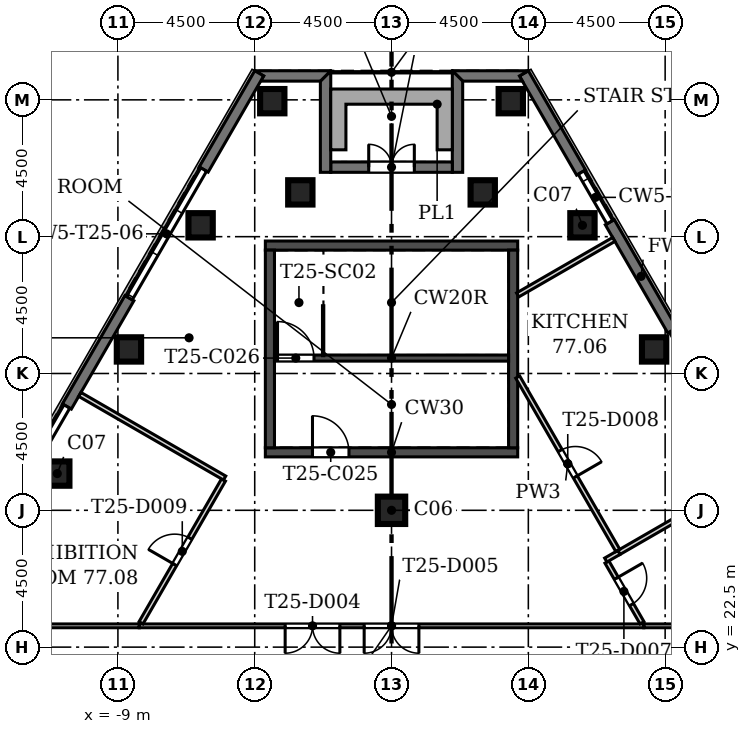
"""IFC4 building model, lengths in metres.
Left out: names, types, materials, properties, quantities, classifications, styles, units other than length and angle.
Written with IfcOpenShell. Run it as: python <this file> out.ifc"""

import sys

from ifc_helpers import new_model, si_unit, direction, frame, frame_2d, origin, origin_2d, place, context, subcontext, project, spatial, polyline, rectangle, outline, extrude, element, fill, save


model = new_model("IFC4")
c1 = context("Model", 3, precision=1e-05, world=origin(), true_north=direction((0.0, 1.0)))
c2 = subcontext(c1, "Body", "Model", "MODEL_VIEW")
j1 = project(units=[si_unit("LENGTHUNIT", "METRE"), si_unit("PLANEANGLEUNIT", "RADIAN")], contexts=[c1])
p1 = place(None, origin())
s1 = spatial("IfcSite", under=j1, at=p1, CompositionType="ELEMENT")
p2 = place(p1, origin())
s2 = spatial("IfcBuilding", under=s1, at=p2, CompositionType="ELEMENT")
p3 = place(p2, frame((0.0, 0.0, 339.3)))
s3 = spatial("IfcBuildingStorey", under=s2, at=p3, CompositionType="ELEMENT", Elevation=339.3)
for number, where, z_axis, x_axis in (
    (1, (8.637, 32.291, 0.0), (0.0, 0.0, 1.0), (1.0, 0.0, 0.0)),
    (2, (6.28, 36.374, 0.0), (0.0, 0.0, 1.0), (1.0, 0.0, 0.0)),
    (3, (3.923, 40.457, 0.0), (0.0, 0.0, 1.0), (1.0, 0.0, 0.0)),
    (4, (3.0, 37.457, 0.0), (0.0, 0.0, 1.0), (1.0, 0.0, 0.0)),
    (5, (-3.0, 37.457, 0.0), (0.0, 0.0, 1.0), (1.0, 0.0, 0.0)),
    (6, (-3.923, 40.457, 0.0), (0.0, 0.0, 1.0), (1.0, 0.0, 0.0)),
    (7, (-6.28, 36.374, 0.0), (0.0, 0.0, 1.0), (1.0, 0.0, 0.0)),
    (8, (-8.637, 32.291, 0.0), (0.0, 0.0, 1.0), (1.0, 0.0, 0.0)),
    (9, (-10.994, 28.208, 0.0), (0.0, 0.0, 1.0), (1.0, 0.0, 0.0)),
):
    element("IfcColumn", number, at=place(p3, frame(where, z_axis=z_axis, x_axis=x_axis)), inside=s3, PredefinedType="COLUMN", context=c2, shape_type="SweptSolid", body=[
        extrude(rectangle(XDim=0.8, YDim=0.8, at=origin_2d()), origin(), (0.0, 0.0, 1.0), 5.4),
    ])
p4 = place(p3, frame((0.0, 27.0, 0.0), z_axis=(0.0, 0.0, 1.0), x_axis=(1.0, 0.0, 0.0)))
e10 = element("IfcColumn", 10, at=p4, inside=s3, PredefinedType="COLUMN", context=c2, shape_type="SweptSolid", body=[
    extrude(rectangle(XDim=0.9, YDim=0.9, at=origin_2d()), origin(), (0.0, 0.0, 1.0), 5.4),
])
p5 = place(p3, frame((9.237, 32.913, 0.0), z_axis=(0.0, 0.0, 1.0), x_axis=(-0.500044296292, 0.865999827798, 0.0)))
e11 = element("IfcWall", 11, at=p5, inside=s3, PredefinedType="SOLIDWALL", context=c2, shape_type="SweptSolid", body=[
    extrude(rectangle(XDim=4.115, YDim=0.34, at=frame_2d((2.058, 0.0))), origin(), (0.0, 0.0, 1.0), 4.6),
])
p6 = place(p3, frame((6.237, 38.109, 0.0), z_axis=(0.0, 0.0, 1.0), x_axis=(-0.500014143148, 0.86601723808, 0.0)))
e12 = element("IfcWall", 12, at=p6, inside=s3, PredefinedType="SOLIDWALL", context=c2, shape_type="SweptSolid", body=[
    extrude(rectangle(XDim=3.768, YDim=0.34, at=frame_2d((1.884, 0.0))), origin(), (0.0, 0.0, 1.0), 4.6),
])
p7 = place(p3, origin())
e13 = element("IfcWall", 13, at=p7, inside=s3, PredefinedType="SOLIDWALL", context=c2, shape_type="SweptSolid", body=[
    extrude(outline(polyline([(1.999, 41.457), (4.501, 41.457), (4.501, 41.457), (4.206, 41.286), (4.305, 41.116), (2.34, 41.116), (1.999, 41.457), (1.999, 41.457)])), origin(), (0.0, 0.0, 1.0), 4.6),
])
p8 = place(p3, origin())
e14 = element("IfcWall", 14, at=p8, inside=s3, PredefinedType="SOLIDWALL", context=c2, shape_type="SweptSolid", body=[
    extrude(outline(polyline([(2.341, 38.116), (2.0, 38.116), (2.0, 41.458), (2.0, 41.458), (2.341, 41.117), (2.341, 38.116)])), origin(), (0.0, 0.0, 1.0), 4.6),
])
p9 = place(p3, frame((2.0, 38.287, 0.0), z_axis=(0.0, 0.0, 1.0), x_axis=(-1.0, 0.0, 0.0)))
e15 = element("IfcWall", 15, at=p9, inside=s3, PredefinedType="SOLIDWALL", context=c2, shape_type="SweptSolid", body=[
    extrude(rectangle(XDim=4.0, YDim=0.34, at=frame_2d((2.0, 0.0))), origin(), (0.0, 0.0, 1.0), 4.6),
])
p10 = place(p9, frame((1.25, 0.0, 0.0)))
e16 = element("IfcOpeningElement", 16, at=p10, cuts=e15, PredefinedType="OPENING", context=c2, shape_type="SweptSolid", body=[
    extrude(rectangle(XDim=1.5, YDim=2.4, at=frame_2d((0.75, 1.2))), frame((0.0, 0.18, 0.0), z_axis=(0.0, -1.0, 0.0), x_axis=(1.0, 0.0, 0.0)), (0.0, 0.0, 1.0), 0.36),
])
p11 = place(p3, origin())
e17 = element("IfcWall", 17, at=p11, inside=s3, PredefinedType="SOLIDWALL", context=c2, shape_type="SweptSolid", body=[
    extrude(outline(polyline([(-2.0, 41.458), (-2.0, 38.116), (-2.341, 38.116), (-2.341, 41.117), (-2.0, 41.458), (-2.0, 41.458)])), origin(), (0.0, 0.0, 1.0), 4.6),
])
p12 = place(p3, origin())
e18 = element("IfcWall", 18, at=p12, inside=s3, PredefinedType="SOLIDWALL", context=c2, shape_type="SweptSolid", body=[
    extrude(outline(polyline([(-4.305, 41.116), (-4.206, 41.286), (-4.501, 41.457), (-4.501, 41.457), (-1.999, 41.457), (-1.999, 41.457), (-2.34, 41.116), (-4.305, 41.116)])), origin(), (0.0, 0.0, 1.0), 4.6),
])
p13 = place(p3, frame((-4.353, 41.372, 0.0), z_axis=(0.0, 0.0, 1.0), x_axis=(-0.499992475648, -0.866029747927, 0.0)))
e19 = element("IfcWall", 19, at=p13, inside=s3, PredefinedType="SOLIDWALL", context=c2, shape_type="SweptSolid", body=[
    extrude(rectangle(XDim=3.652, YDim=0.34, at=frame_2d((1.826, 0.0))), origin(), (0.0, 0.0, 1.0), 4.6),
])
p14 = place(p3, frame((-8.622, 33.978, 0.0), z_axis=(0.0, 0.0, 1.0), x_axis=(-0.499974107589, -0.866040352259, 0.0)))
e20 = element("IfcWall", 20, at=p14, inside=s3, PredefinedType="SOLIDWALL", context=c2, shape_type="SweptSolid", body=[
    extrude(rectangle(XDim=4.115, YDim=0.34, at=frame_2d((2.058, 0.0))), origin(), (0.0, 0.0, 1.0), 4.6),
])
p15 = place(p3, origin())
e21 = element("IfcWall", 21, at=p15, inside=s3, PredefinedType="USERDEFINED", context=c2, shape_type="SweptSolid", body=[
    extrude(outline(polyline([(-1.5, 40.857), (-2.0, 40.857), (-2.0, 40.357), (-2.0, 38.857), (-1.5, 38.857), (-1.5, 40.357), (1.5, 40.357), (1.5, 38.857), (2.0, 38.857), (2.0, 40.357), (2.0, 40.857), (1.5, 40.857), (-1.5, 40.857)])), origin(), (0.0, 0.0, 1.0), 1.1),
])
p16 = place(p3, frame((-4.15, 28.907, -0.4), z_axis=(0.0, 0.0, 1.0), x_axis=(1.0, 0.0, 0.0)))
e22 = element("IfcWall", 22, at=p16, inside=s3, PredefinedType="SOLIDWALL", context=c2, shape_type="SweptSolid", body=[
    extrude(rectangle(XDim=8.3, YDim=0.3, at=frame_2d((4.15, 0.0))), origin(), (0.0, 0.0, 1.0), 5.0),
])
p17 = place(p16, frame((1.55, 0.0, 0.4)))
e23 = element("IfcOpeningElement", 23, at=p17, cuts=e22, PredefinedType="OPENING", context=c2, shape_type="SweptSolid", body=[
    extrude(rectangle(XDim=1.2, YDim=2.1, at=frame_2d((0.6, 1.05))), frame((0.0, 0.16, 0.0), z_axis=(0.0, -1.0, 0.0), x_axis=(1.0, 0.0, 0.0)), (0.0, 0.0, 1.0), 0.32),
])
p18 = place(p3, frame((-4.15, 35.707, -0.4), z_axis=(0.0, 0.0, 1.0), x_axis=(1.0, 0.0, 0.0)))
e24 = element("IfcWall", 24, at=p18, inside=s3, PredefinedType="SOLIDWALL", context=c2, shape_type="SweptSolid", body=[
    extrude(rectangle(XDim=8.3, YDim=0.3, at=frame_2d((4.15, 0.0))), origin(), (0.0, 0.0, 1.0), 5.0),
])
for number, where, z_axis, x_axis in (
    (25, (-4.0, 29.057, -0.4), (0.0, 0.0, 1.0), (0.0, 1.0, 0.0)),
    (26, (4.0, 29.057, -0.4), (0.0, 0.0, 1.0), (0.0, 1.0, 0.0)),
):
    element("IfcWall", number, at=place(p3, frame(where, z_axis=z_axis, x_axis=x_axis)), inside=s3, PredefinedType="SOLIDWALL", context=c2, shape_type="SweptSolid", body=[
        extrude(rectangle(XDim=6.5, YDim=0.3, at=frame_2d((3.25, 0.0))), origin(), (0.0, 0.0, 1.0), 5.0),
    ])
p19 = place(p3, frame((-3.85, 32.007, -0.4), z_axis=(0.0, 0.0, 1.0), x_axis=(1.0, 0.0, 0.0)))
e27 = element("IfcWall", 27, at=p19, inside=s3, PredefinedType="SOLIDWALL", context=c2, shape_type="SweptSolid", body=[
    extrude(rectangle(XDim=7.7, YDim=0.2, at=frame_2d((3.85, 0.0))), origin(), (0.0, 0.0, 1.0), 5.0),
])
p20 = place(p19, frame((0.1, 0.0, 0.4)))
e28 = element("IfcOpeningElement", 28, at=p20, cuts=e27, PredefinedType="OPENING", context=c2, shape_type="SweptSolid", body=[
    extrude(rectangle(XDim=1.2, YDim=2.1, at=frame_2d((0.6, 1.05))), frame((0.0, 0.11, 0.0), z_axis=(0.0, -1.0, 0.0), x_axis=(1.0, 0.0, 0.0)), (0.0, 0.0, 1.0), 0.22),
])
p21 = place(p3, frame((8.297, 23.2, 0.0), z_axis=(0.0, 0.0, 1.0), x_axis=(1.0, 0.0, 0.0)))
e29 = element("IfcWall", 29, at=p21, inside=s3, PredefinedType="PARTITIONING", context=c2, shape_type="SweptSolid", body=[
    extrude(rectangle(XDim=1.303, YDim=0.125, at=frame_2d((0.651, 0.0))), origin(), (0.0, 0.0, 1.0), 4.6),
])
p22 = place(p3, frame((-8.297, 23.2, 0.0), z_axis=(0.0, 0.0, 1.0), x_axis=(1.0, 0.0, 0.0)))
e30 = element("IfcWall", 30, at=p22, inside=s3, PredefinedType="PARTITIONING", context=c2, shape_type="SweptSolid", body=[
    extrude(rectangle(XDim=16.594, YDim=0.125, at=frame_2d((8.297, 0.0))), origin(), (0.0, 0.0, 1.0), 4.6),
])
p23 = place(p22, frame((4.798, 0.0, 0.0)))
e31 = element("IfcOpeningElement", 31, at=p23, cuts=e30, PredefinedType="OPENING", context=c2, shape_type="SweptSolid", body=[
    extrude(rectangle(XDim=1.8, YDim=2.1, at=frame_2d((0.9, 1.05))), frame((0.0, 0.073, 0.0), z_axis=(0.0, -1.0, 0.0), x_axis=(1.0, 0.0, 0.0)), (0.0, 0.0, 1.0), 0.145),
])
p24 = place(p22, frame((7.397, 0.0, 0.0)))
e32 = element("IfcOpeningElement", 32, at=p24, cuts=e30, PredefinedType="OPENING", context=c2, shape_type="SweptSolid", body=[
    extrude(rectangle(XDim=1.8, YDim=2.1, at=frame_2d((0.9, 1.05))), frame((0.0, 0.073, 0.0), z_axis=(0.0, -1.0, 0.0), x_axis=(1.0, 0.0, 0.0)), (0.0, 0.0, 1.0), 0.145),
])
p25 = place(p3, frame((-12.0, 23.2, 0.0), z_axis=(0.0, 0.0, 1.0), x_axis=(1.0, 0.0, 0.0)))
e33 = element("IfcWall", 33, at=p25, inside=s3, PredefinedType="PARTITIONING", context=c2, shape_type="SweptSolid", body=[
    extrude(rectangle(XDim=3.703, YDim=0.125, at=frame_2d((1.852, 0.0))), origin(), (0.0, 0.0, 1.0), 4.6),
])
p26 = place(p3, frame((7.48, 25.615, 0.0), z_axis=(0.0, 0.0, 1.0), x_axis=(0.866046596414, 0.499963291492, 0.0)))
e34 = element("IfcWall", 34, at=p26, inside=s3, PredefinedType="PARTITIONING", context=c2, shape_type="SweptSolid", body=[
    extrude(rectangle(XDim=4.387, YDim=0.15, at=frame_2d((2.194, 0.0))), origin(), (0.0, 0.0, 1.0), 4.6),
])
p27 = place(p3, frame((8.239, 23.3, 0.0), z_axis=(0.0, 0.0, 1.0), x_axis=(-0.499972710878, 0.866041158593, 0.0)))
e35 = element("IfcWall", 35, at=p27, inside=s3, PredefinedType="PARTITIONING", context=c2, shape_type="SweptSolid", body=[
    extrude(rectangle(XDim=2.308, YDim=0.15, at=frame_2d((1.154, 0.0))), origin(), (0.0, 0.0, 1.0), 4.6),
])
p28 = place(p27, frame((0.691, 0.0, 0.0)))
e36 = element("IfcOpeningElement", 36, at=p28, cuts=e35, PredefinedType="OPENING", context=c2, shape_type="SweptSolid", body=[
    extrude(rectangle(XDim=1.0, YDim=2.1, at=frame_2d((0.5, 1.05))), frame((0.0, 0.085, 0.0), z_axis=(0.0, -1.0, 0.0), x_axis=(1.0, 0.0, 0.0)), (0.0, 0.0, 1.0), 0.17),
])
p29 = place(p3, frame((7.047, 25.365, 0.0), z_axis=(0.0, 0.0, 1.0), x_axis=(0.866071776036, 0.499919672301, 0.0)))
e37 = element("IfcWall", 37, at=p29, inside=s3, PredefinedType="PARTITIONING", context=c2, shape_type="SweptSolid", body=[
    extrude(rectangle(XDim=0.5, YDim=0.15, at=frame_2d((0.25, 0.0))), origin(), (0.0, 0.0, 1.0), 4.6),
])
p30 = place(p3, frame((7.443, 25.679, 0.0), z_axis=(0.0, 0.0, 1.0), x_axis=(-0.500014467694, 0.866017050696, 0.0)))
e38 = element("IfcWall", 38, at=p30, inside=s3, PredefinedType="PARTITIONING", context=c2, shape_type="SweptSolid", body=[
    extrude(rectangle(XDim=6.586, YDim=0.15, at=frame_2d((3.293, 0.0))), origin(), (0.0, 0.0, 1.0), 4.6),
])
p31 = place(p30, frame((2.793, 0.0, 0.0)))
e39 = element("IfcOpeningElement", 39, at=p31, cuts=e38, PredefinedType="OPENING", context=c2, shape_type="SweptSolid", body=[
    extrude(rectangle(XDim=1.0, YDim=2.1, at=frame_2d((0.5, 1.05))), frame((0.0, 0.085, 0.0), z_axis=(0.0, -1.0, 0.0), x_axis=(1.0, 0.0, 0.0)), (0.0, 0.0, 1.0), 0.17),
])
p32 = place(p3, frame((4.15, 34.084, 0.0), z_axis=(0.0, 0.0, 1.0), x_axis=(0.866036312054, 0.499981105847, 0.0)))
e40 = element("IfcWall", 40, at=p32, inside=s3, PredefinedType="PARTITIONING", context=c2, shape_type="SweptSolid", body=[
    extrude(rectangle(XDim=3.65, YDim=0.15, at=frame_2d((1.825, 0.0))), origin(), (0.0, 0.0, 1.0), 4.6),
])
p33 = place(p3, frame((-8.239, 23.3, 0.0), z_axis=(0.0, 0.0, 1.0), x_axis=(0.499997823047, 0.866026660645, 0.0)))
e41 = element("IfcWall", 41, at=p33, inside=s3, PredefinedType="PARTITIONING", context=c2, shape_type="SweptSolid", body=[
    extrude(rectangle(XDim=5.423, YDim=0.15, at=frame_2d((2.712, 0.0))), origin(), (0.0, 0.0, 1.0), 4.6),
])
p34 = place(p33, frame((2.212, 0.0, 0.0)))
e42 = element("IfcOpeningElement", 42, at=p34, cuts=e41, PredefinedType="OPENING", context=c2, shape_type="SweptSolid", body=[
    extrude(rectangle(XDim=1.0, YDim=2.1, at=frame_2d((0.5, 1.05))), frame((0.0, 0.085, 0.0), z_axis=(0.0, -1.0, 0.0), x_axis=(1.0, 0.0, 0.0)), (0.0, 0.0, 1.0), 0.17),
])
p35 = place(p3, frame((-5.49, 28.062, 0.0), z_axis=(0.0, 0.0, 1.0), x_axis=(-0.866027397988, 0.499996545922, 0.0)))
e43 = element("IfcWall", 43, at=p35, inside=s3, PredefinedType="PARTITIONING", context=c2, shape_type="SweptSolid", body=[
    extrude(rectangle(XDim=5.5, YDim=0.15, at=frame_2d((2.75, 0.0))), origin(), (0.0, 0.0, 1.0), 4.6),
])
p36 = place(p10, frame((1.5, 0.0, 0.0), z_axis=(0.0, 0.0, 1.0), x_axis=(-1.0, 0.0, 0.0)))
e44 = element("IfcDoor", 44, at=p36, inside=s3, OperationType="DOUBLE_DOOR_SINGLE_SWING", PredefinedType="DOOR", context=c2, shape_type="SweptSolid", body=[
    extrude(rectangle(XDim=1.5, YDim=2.4, at=frame_2d((0.75, 1.2))), frame((0.0, 0.025, 0.0), z_axis=(0.0, -1.0, 0.0), x_axis=(1.0, 0.0, 0.0)), (0.0, 0.0, 1.0), 0.05),
])
fill(e16, e44)
p37 = place(p17, origin())
e45 = element("IfcDoor", 45, at=p37, inside=s3, OperationType="SINGLE_SWING_LEFT", PredefinedType="DOOR", context=c2, shape_type="SweptSolid", body=[
    extrude(rectangle(XDim=1.2, YDim=2.1, at=frame_2d((0.6, 1.05))), frame((0.0, 0.025, 0.0), z_axis=(0.0, -1.0, 0.0), x_axis=(1.0, 0.0, 0.0)), (0.0, 0.0, 1.0), 0.05),
])
fill(e23, e45)
p38 = place(p20, origin())
e46 = element("IfcDoor", 46, at=p38, inside=s3, OperationType="SINGLE_SWING_LEFT", PredefinedType="DOOR", context=c2, shape_type="SweptSolid", body=[
    extrude(rectangle(XDim=1.2, YDim=2.1, at=frame_2d((0.6, 1.05))), frame((0.0, 0.025, 0.0), z_axis=(0.0, -1.0, 0.0), x_axis=(1.0, 0.0, 0.0)), (0.0, 0.0, 1.0), 0.05),
])
fill(e28, e46)
p39 = place(p23, frame((1.8, 0.0, 0.0), z_axis=(0.0, 0.0, 1.0), x_axis=(-1.0, 0.0, 0.0)))
e47 = element("IfcDoor", 47, at=p39, inside=s3, OperationType="DOUBLE_DOOR_SINGLE_SWING", PredefinedType="DOOR", context=c2, shape_type="SweptSolid", body=[
    extrude(rectangle(XDim=1.8, YDim=2.1, at=frame_2d((0.9, 1.05))), frame((0.0, 0.025, 0.0), z_axis=(0.0, -1.0, 0.0), x_axis=(1.0, 0.0, 0.0)), (0.0, 0.0, 1.0), 0.05),
])
fill(e31, e47)
p40 = place(p24, frame((1.8, 0.0, 0.0), z_axis=(0.0, 0.0, 1.0), x_axis=(-1.0, 0.0, 0.0)))
e48 = element("IfcDoor", 48, at=p40, inside=s3, OperationType="DOUBLE_DOOR_SINGLE_SWING", PredefinedType="DOOR", context=c2, shape_type="SweptSolid", body=[
    extrude(rectangle(XDim=1.8, YDim=2.1, at=frame_2d((0.9, 1.05))), frame((0.0, 0.025, 0.0), z_axis=(0.0, -1.0, 0.0), x_axis=(1.0, 0.0, 0.0)), (0.0, 0.0, 1.0), 0.05),
])
fill(e32, e48)
p41 = place(p28, frame((1.0, 0.0, 0.0), z_axis=(0.0, 0.0, 1.0), x_axis=(-1.0, 0.0, 0.0)))
e49 = element("IfcDoor", 49, at=p41, inside=s3, OperationType="SINGLE_SWING_LEFT", PredefinedType="DOOR", context=c2, shape_type="SweptSolid", body=[
    extrude(rectangle(XDim=1.0, YDim=2.1, at=frame_2d((0.5, 1.05))), frame((0.0, 0.025, 0.0), z_axis=(0.0, -1.0, 0.0), x_axis=(1.0, 0.0, 0.0)), (0.0, 0.0, 1.0), 0.05),
])
fill(e36, e49)
p42 = place(p31, frame((1.0, 0.0, 0.0), z_axis=(0.0, 0.0, 1.0), x_axis=(-1.0, 0.0, 0.0)))
e50 = element("IfcDoor", 50, at=p42, inside=s3, OperationType="SINGLE_SWING_RIGHT", PredefinedType="DOOR", context=c2, shape_type="SweptSolid", body=[
    extrude(rectangle(XDim=1.0, YDim=2.1, at=frame_2d((0.5, 1.05))), frame((0.0, 0.025, 0.0), z_axis=(0.0, -1.0, 0.0), x_axis=(1.0, 0.0, 0.0)), (0.0, 0.0, 1.0), 0.05),
])
fill(e39, e50)
p43 = place(p34, origin())
e51 = element("IfcDoor", 51, at=p43, inside=s3, OperationType="SINGLE_SWING_LEFT", PredefinedType="DOOR", context=c2, shape_type="SweptSolid", body=[
    extrude(rectangle(XDim=1.0, YDim=2.1, at=frame_2d((0.5, 1.05))), frame((0.0, 0.025, 0.0), z_axis=(0.0, -1.0, 0.0), x_axis=(1.0, 0.0, 0.0)), (0.0, 0.0, 1.0), 0.05),
])
fill(e42, e51)
save(model, sys.argv[1])
